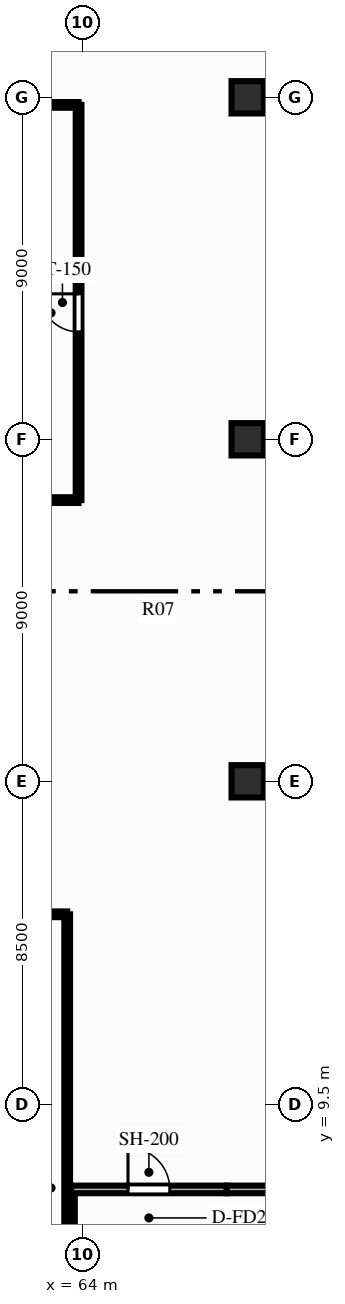
"""IFC4 building model, lengths in metres.
Left out: names, types, materials, properties, quantities, classifications, styles, units other than length and angle.
Written with IfcOpenShell. Run it as: python <this file> out.ifc"""

import sys

from ifc_helpers import new_model, si_unit, direction, frame, frame_2d, origin, origin_2d, place, context, subcontext, project, spatial, rectangle, circle, extrude, source, transform, mapped, element, fill, save


model = new_model("IFC4")
c1 = context("Model", 3, precision=1e-05, world=origin(), true_north=direction((0.0, 1.0)))
c2 = subcontext(c1, "Body", "Model", "MODEL_VIEW")
j1 = project(units=[si_unit("LENGTHUNIT", "METRE"), si_unit("PLANEANGLEUNIT", "RADIAN")], contexts=[c1])
p1 = place(None, origin())
s1 = spatial("IfcSite", under=j1, at=p1, CompositionType="ELEMENT")
p2 = place(p1, origin())
s2 = spatial("IfcBuilding", under=s1, at=p2, CompositionType="ELEMENT")
p3 = place(p2, origin())
s3 = spatial("IfcBuildingStorey", under=s2, at=p3, CompositionType="ELEMENT", Elevation=0.0)
m1 = source(origin(), c2, "Body", "SweptSolid", [
    extrude(circle(Radius=0.425, at=origin_2d()), origin(), (0.0, 0.0, 1.0), 4.2),
])
for number, where, z_axis, x_axis in (
    (1, (68.35, 18.0, 0.0), (0.0, 0.0, 1.0), (1.0, 0.0, 0.0)),
    (2, (68.35, 27.0, 0.0), (0.0, 0.0, 1.0), (1.0, 0.0, 0.0)),
    (3, (68.35, 36.0, 0.0), (0.0, 0.0, 1.0), (1.0, 0.0, 0.0)),
):
    element("IfcColumn", number, at=place(p3, frame(where, z_axis=z_axis, x_axis=x_axis)), inside=s3, PredefinedType="COLUMN", context=c2, shape_type="MappedRepresentation", body=[
        mapped(m1, transform((0.0, 0.0, 0.0), scale=1.0)),
    ])
p4 = place(p3, frame((63.7, 4.39, 0.0), z_axis=(0.0, 0.0, 1.0), x_axis=(0.0, 1.0, 0.0)))
e4 = element("IfcWall", 4, at=p4, inside=s3, PredefinedType="PARTITIONING", context=c2, shape_type="SweptSolid", body=[
    extrude(rectangle(XDim=2.87, YDim=0.2, at=frame_2d((1.435, 0.0))), origin(), (0.0, 0.0, 1.0), 3.92),
])
p5 = place(p3, frame((63.7, 7.26, 0.0), z_axis=(0.0, 0.0, 1.0), x_axis=(1.0, 0.0, 0.0)))
e5 = element("IfcWall", 5, at=p5, inside=s3, PredefinedType="PARTITIONING", context=c2, shape_type="SweptSolid", body=[
    extrude(rectangle(XDim=4.1, YDim=0.2, at=frame_2d((2.05, 0.0))), origin(), (0.0, 0.0, 1.0), 3.92),
])
p6 = place(p5, frame((2.6, 0.0, 0.0), z_axis=(0.0, 0.0, 1.0), x_axis=(-1.0, 0.0, 0.0)))
e6 = element("IfcOpeningElement", 6, at=p6, cuts=e5, PredefinedType="OPENING", context=c2, shape_type="SweptSolid", body=[
    extrude(rectangle(XDim=1.1, YDim=2.15, at=frame_2d((0.55, 1.075))), frame((0.0, 0.112, 0.0), z_axis=(0.0, -1.0, 0.0), x_axis=(1.0, 0.0, 0.0)), (0.0, 0.0, 1.0), 0.224),
])
p7 = place(p3, frame((67.8, 7.26, 0.0), z_axis=(0.0, 0.0, 1.0), x_axis=(1.0, 0.0, 0.0)))
e7 = element("IfcWall", 7, at=p7, inside=s3, PredefinedType="PARTITIONING", context=c2, shape_type="SweptSolid", body=[
    extrude(rectangle(XDim=8.05, YDim=0.2, at=frame_2d((4.025, 0.0))), origin(), (0.0, 0.0, 1.0), 3.92),
])
p8 = place(p3, frame((48.0, 14.5, 0.0), z_axis=(0.0, 0.0, 1.0), x_axis=(1.0, 0.0, 0.0)))
e8 = element("IfcWall", 8, at=p8, inside=s3, PredefinedType="PARTITIONING", context=c2, shape_type="SweptSolid", body=[
    extrude(rectangle(XDim=15.6, YDim=0.15, at=frame_2d((7.8, 0.0))), origin(), (0.0, 0.0, 1.0), 3.92),
])
p9 = place(p8, frame((6.865, 0.0, 0.0)))
e9 = element("IfcOpeningElement", 9, at=p9, cuts=e8, PredefinedType="OPENING", context=c2, shape_type="SweptSolid", body=[
    extrude(rectangle(XDim=1.0, YDim=2.1, at=frame_2d((0.5, 1.05))), frame((0.0, 0.087, 0.0), z_axis=(0.0, -1.0, 0.0), x_axis=(1.0, 0.0, 0.0)), (0.0, 0.0, 1.0), 0.174),
])
p10 = place(p3, frame((63.6, 0.1, 0.0), z_axis=(0.0, 0.0, 1.0), x_axis=(0.0, 1.0, 0.0)))
e10 = element("IfcWall", 10, at=p10, inside=s3, PredefinedType="PARTITIONING", context=c2, shape_type="SweptSolid", body=[
    extrude(rectangle(XDim=14.4, YDim=0.15, at=frame_2d((7.2, 0.0))), origin(), (0.0, 0.0, 1.0), 3.92),
])
for number, where, z_axis, x_axis in (
    (11, (48.65, 25.4, 0.0), (0.0, 0.0, 1.0), (1.0, 0.0, 0.0)),
    (12, (48.65, 35.8, 0.0), (0.0, 0.0, 1.0), (1.0, 0.0, 0.0)),
):
    element("IfcWall", number, at=place(p3, frame(where, z_axis=z_axis, x_axis=x_axis)), inside=s3, PredefinedType="PARTITIONING", context=c2, shape_type="SweptSolid", body=[
        extrude(rectangle(XDim=15.25, YDim=0.15, at=frame_2d((7.625, 0.0))), origin(), (0.0, 0.0, 1.0), 3.92),
    ])
p11 = place(p3, frame((63.9, 25.4, 0.0), z_axis=(0.0, 0.0, 1.0), x_axis=(0.0, 1.0, 0.0)))
e13 = element("IfcWall", 13, at=p11, inside=s3, PredefinedType="PARTITIONING", context=c2, shape_type="SweptSolid", body=[
    extrude(rectangle(XDim=10.4, YDim=0.15, at=frame_2d((5.2, 0.0))), origin(), (0.0, 0.0, 1.0), 3.92),
])
p12 = place(p11, frame((4.428, 0.0, 0.0)))
e14 = element("IfcOpeningElement", 14, at=p12, cuts=e13, PredefinedType="OPENING", context=c2, shape_type="SweptSolid", body=[
    extrude(rectangle(XDim=1.0, YDim=2.1, at=frame_2d((0.5, 1.05))), frame((0.0, 0.087, 0.0), z_axis=(0.0, -1.0, 0.0), x_axis=(1.0, 0.0, 0.0)), (0.0, 0.0, 1.0), 0.174),
])
m2 = source(origin(), c2, "Body", "SweptSolid", [
    extrude(rectangle(XDim=1.1, YDim=2.15, at=frame_2d((0.55, 1.075))), frame((0.0, 0.025, 0.0), z_axis=(0.0, -1.0, 0.0), x_axis=(1.0, 0.0, 0.0)), (0.0, 0.0, 1.0), 0.05),
])
p13 = place(p6, origin())
e15 = element("IfcDoor", 15, at=p13, inside=s3, OperationType="SINGLE_SWING_RIGHT", PredefinedType="DOOR", context=c2, shape_type="MappedRepresentation", body=[
    mapped(m2, transform((0.0, 0.0, 0.0), scale=1.0)),
])
fill(e6, e15)
m3 = source(origin(), c2, "Body", "SweptSolid", [
    extrude(rectangle(XDim=1.0, YDim=2.1, at=frame_2d((0.5, 1.05))), frame((0.0, 0.025, 0.0), z_axis=(0.0, -1.0, 0.0), x_axis=(1.0, 0.0, 0.0)), (0.0, 0.0, 1.0), 0.05),
])
p14 = place(p12, origin())
e16 = element("IfcDoor", 16, at=p14, inside=s3, OperationType="SINGLE_SWING_RIGHT", PredefinedType="DOOR", context=c2, shape_type="MappedRepresentation", body=[
    mapped(m3, transform((0.0, 0.0, 0.0), scale=1.0)),
])
fill(e14, e16)
save(model, sys.argv[1])
